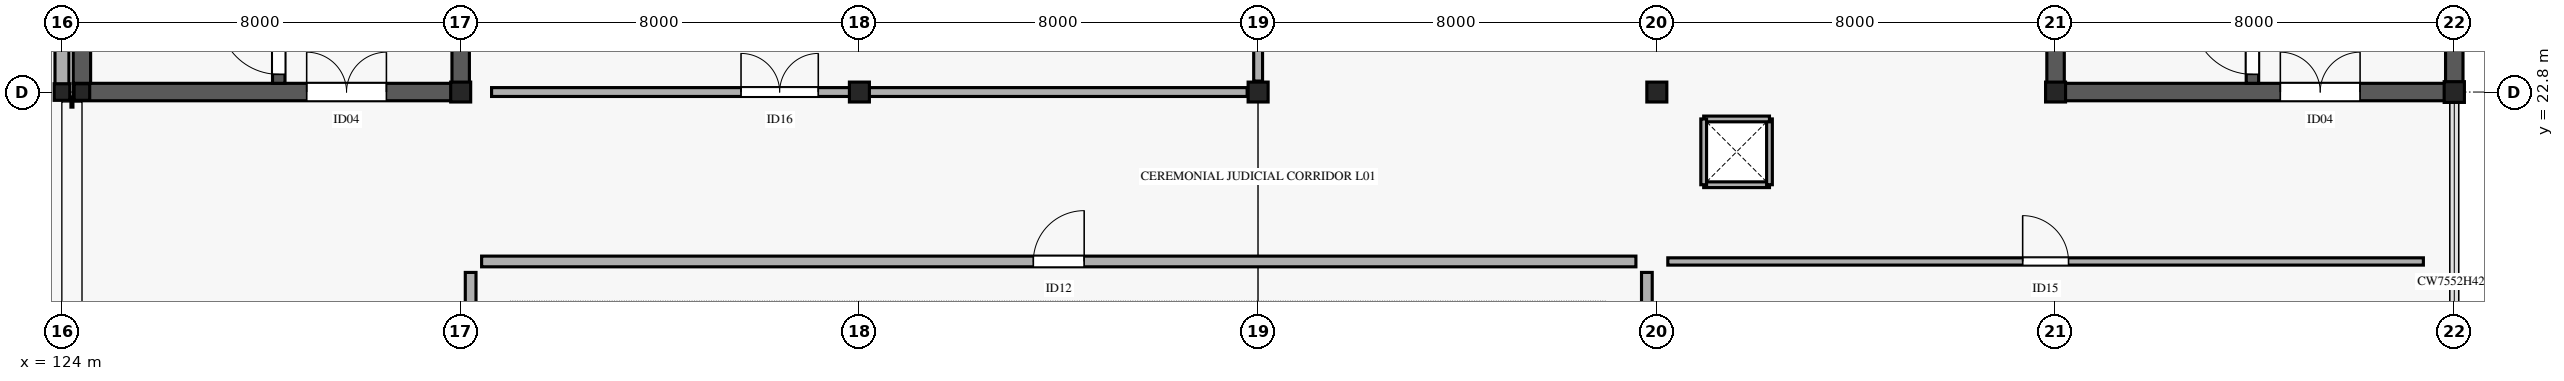
"""IFC4 building model, lengths in metres.
Left out: names, types, materials, properties, quantities, classifications, styles, units other than length and angle.
Written with IfcOpenShell. Run it as: python <this file> out.ifc"""

import sys

from ifc_helpers import new_model, si_unit, direction, frame, frame_2d, origin, origin_2d, place, context, subcontext, project, spatial, rectangle, i_section, extrude, element, fill, save


model = new_model("IFC4")
c1 = context("Model", 3, precision=1e-05, world=origin(), true_north=direction((0.0, 1.0)))
c2 = subcontext(c1, "Body", "Model", "MODEL_VIEW")
j1 = project(units=[si_unit("LENGTHUNIT", "METRE"), si_unit("PLANEANGLEUNIT", "RADIAN")], contexts=[c1])
p1 = place(None, origin())
s1 = spatial("IfcSite", under=j1, at=p1, CompositionType="ELEMENT")
p2 = place(p1, origin())
s2 = spatial("IfcBuilding", under=s1, at=p2, CompositionType="ELEMENT")
p3 = place(p2, frame((0.0, 0.0, 5.4)))
s3 = spatial("IfcBuildingStorey", under=s2, at=p3, CompositionType="ELEMENT", Elevation=5.4)
p4 = place(p3, frame((124.4, 22.8, 0.0), z_axis=(0.0, 0.0, 1.0), x_axis=(1.0, 0.0, 0.0)))
e1 = element("IfcColumn", 1, at=p4, inside=s3, PredefinedType="COLUMN", context=c2, shape_type="SweptSolid", body=[
    extrude(i_section(OverallWidth=0.313, OverallDepth=0.333, WebThickness=0.018, FlangeThickness=0.028, FilletRadius=0.015, at=origin_2d()), origin(), (0.0, 0.0, 1.0), 5.185),
])
for number, where, z_axis, x_axis in (
    (2, (132.0, 22.8, 0.0), (0.0, 0.0, 1.0), (1.0, 0.0, 0.0)),
    (3, (140.0, 22.8, 0.0), (0.0, 0.0, 1.0), (1.0, 0.0, 0.0)),
    (4, (148.0, 22.8, 0.0), (0.0, 0.0, 1.0), (1.0, 0.0, 0.0)),
    (5, (156.0, 22.8, 0.0), (0.0, 0.0, 1.0), (1.0, 0.0, 0.0)),
    (6, (164.0, 22.8, 0.0), (0.0, 0.0, 1.0), (1.0, 0.0, 0.0)),
):
    element("IfcColumn", number, at=place(p3, frame(where, z_axis=z_axis, x_axis=x_axis)), inside=s3, PredefinedType="COLUMN", context=c2, shape_type="SweptSolid", body=[
        extrude(i_section(OverallWidth=0.401, OverallDepth=0.399, WebThickness=0.025, FlangeThickness=0.04, FilletRadius=0.015, at=origin_2d()), origin(), (0.0, 0.0, 1.0), 5.185),
    ])
p5 = place(p3, frame((172.0, 22.8, 0.0), z_axis=(0.0, 0.0, 1.0), x_axis=(1.0, 0.0, 0.0)))
e7 = element("IfcColumn", 7, at=p5, inside=s3, PredefinedType="COLUMN", context=c2, shape_type="SweptSolid", body=[
    extrude(i_section(OverallWidth=0.406, OverallDepth=0.416, WebThickness=0.03, FlangeThickness=0.048, FilletRadius=0.015, at=origin_2d()), origin(), (0.0, 0.0, 1.0), 5.185),
])
p6 = place(p3, frame((124.0, 22.8, 0.0), z_axis=(0.0, 0.0, 1.0), x_axis=(1.0, 0.0, 0.0)))
e8 = element("IfcColumn", 8, at=p6, inside=s3, PredefinedType="COLUMN", context=c2, shape_type="SweptSolid", body=[
    extrude(i_section(OverallWidth=0.313, OverallDepth=0.333, WebThickness=0.018, FlangeThickness=0.028, FilletRadius=0.015, at=origin_2d()), origin(), (0.0, 0.0, 1.0), 5.185),
])
p7 = place(p3, frame((124.0, 30.42, 0.0), z_axis=(0.0, 0.0, 1.0), x_axis=(0.0, -1.0, 0.0)))
e9 = element("IfcWall", 9, at=p7, inside=s3, PredefinedType="STANDARD", context=c2, shape_type="SweptSolid", body=[
    extrude(rectangle(XDim=7.64, YDim=0.28, at=frame_2d((3.82, 0.0))), origin(), (0.0, 0.0, 1.0), 4.25),
])
p8 = place(p7, frame((2.37, 0.0, 0.75)))
e10 = element("IfcOpeningElement", 10, at=p8, cuts=e9, PredefinedType="OPENING", context=c2, shape_type="SweptSolid", body=[
    extrude(rectangle(XDim=2.9, YDim=2.15, at=frame_2d((1.45, 1.075))), frame((0.0, 0.15, 0.0), z_axis=(0.0, -1.0, 0.0), x_axis=(1.0, 0.0, 0.0)), (0.0, 0.0, 1.0), 0.3),
])
p9 = place(p3, frame((124.18, 22.6, 0.0), z_axis=(0.0, 0.0, 1.0), x_axis=(1.0, 0.0, 0.0)))
e11 = element("IfcWall", 11, at=p9, inside=s3, PredefinedType="STANDARD", context=c2, shape_type="SweptSolid", body=[
    extrude(rectangle(XDim=0.04, YDim=0.205, at=frame_2d((0.02, 0.0))), origin(), (0.0, 0.0, 1.0), 4.62),
])
for number, where, z_axis, x_axis in (
    (12, (156.94, 20.94, 0.0), (0.0, 0.0, 1.0), (1.0, 0.0, 0.0)),
    (13, (158.26, 20.94, 0.0), (0.0, 0.0, 1.0), (0.0, 1.0, 0.0)),
    (14, (158.26, 22.26, 0.0), (0.0, 0.0, 1.0), (-1.0, 0.0, 0.0)),
    (15, (156.94, 22.26, 0.0), (0.0, 0.0, 1.0), (0.0, -1.0, 0.0)),
):
    element("IfcWall", number, at=place(p3, frame(where, z_axis=z_axis, x_axis=x_axis)), inside=s3, PredefinedType="PARTITIONING", context=c2, shape_type="SweptSolid", body=[
        extrude(rectangle(XDim=1.32, YDim=0.115, at=frame_2d((0.66, 0.0))), origin(), (0.0, 0.0, 1.0), 4.35),
    ])
p10 = place(p3, frame((124.225, 22.8, 0.0), z_axis=(0.0, 0.0, 1.0), x_axis=(1.0, 0.0, 0.0)))
e16 = element("IfcWall", 16, at=p10, inside=s3, PredefinedType="SHEAR", context=c2, shape_type="SweptSolid", body=[
    extrude(rectangle(XDim=7.95, YDim=0.35, at=frame_2d((3.975, 0.0))), origin(), (0.0, 0.0, 1.0), 5.19),
])
p11 = place(p10, frame((4.685, 0.0, 0.0)))
e17 = element("IfcOpeningElement", 17, at=p11, cuts=e16, PredefinedType="OPENING", context=c2, shape_type="SweptSolid", body=[
    extrude(rectangle(XDim=1.6, YDim=2.35, at=frame_2d((0.8, 1.175))), frame((0.0, 0.185, 0.0), z_axis=(0.0, -1.0, 0.0), x_axis=(1.0, 0.0, 0.0)), (0.0, 0.0, 1.0), 0.37),
])
for number, where, z_axis, x_axis in (
    (18, (124.4, 22.975, 0.0), (0.0, 0.0, 1.0), (0.0, 1.0, 0.0)),
    (19, (132.0, 22.975, 0.0), (0.0, 0.0, 1.0), (0.0, 1.0, 0.0)),
):
    element("IfcWall", number, at=place(p3, frame(where, z_axis=z_axis, x_axis=x_axis)), inside=s3, PredefinedType="SHEAR", context=c2, shape_type="SweptSolid", body=[
        extrude(rectangle(XDim=7.25, YDim=0.35, at=frame_2d((3.625, 0.0))), origin(), (0.0, 0.0, 1.0), 5.19),
    ])
p12 = place(p3, frame((128.35, 22.975, 0.0), z_axis=(0.0, 0.0, 1.0), x_axis=(0.0, 1.0, 0.0)))
e20 = element("IfcWall", 20, at=p12, inside=s3, PredefinedType="SHEAR", context=c2, shape_type="SweptSolid", body=[
    extrude(rectangle(XDim=7.25, YDim=0.25, at=frame_2d((3.625, 0.0))), origin(), (0.0, 0.0, 1.0), 5.19),
])
p13 = place(p12, frame((0.18, 0.0, 0.0)))
e21 = element("IfcOpeningElement", 21, at=p13, cuts=e20, PredefinedType="OPENING", context=c2, shape_type="SweptSolid", body=[
    extrude(rectangle(XDim=1.2, YDim=2.2, at=frame_2d((0.6, 1.1))), frame((0.0, 0.135, 0.0), z_axis=(0.0, -1.0, 0.0), x_axis=(1.0, 0.0, 0.0)), (0.0, 0.0, 1.0), 0.27),
])
p14 = place(p3, frame((163.825, 22.8, 0.0), z_axis=(0.0, 0.0, 1.0), x_axis=(1.0, 0.0, 0.0)))
e22 = element("IfcWall", 22, at=p14, inside=s3, PredefinedType="SHEAR", context=c2, shape_type="SweptSolid", body=[
    extrude(rectangle(XDim=8.35, YDim=0.35, at=frame_2d((4.175, 0.0))), origin(), (0.0, 0.0, 1.0), 5.19),
])
p15 = place(p14, frame((4.685, 0.0, 0.0)))
e23 = element("IfcOpeningElement", 23, at=p15, cuts=e22, PredefinedType="OPENING", context=c2, shape_type="SweptSolid", body=[
    extrude(rectangle(XDim=1.6, YDim=2.35, at=frame_2d((0.8, 1.175))), frame((0.0, 0.185, 0.0), z_axis=(0.0, -1.0, 0.0), x_axis=(1.0, 0.0, 0.0)), (0.0, 0.0, 1.0), 0.37),
])
for number, where, z_axis, x_axis in (
    (24, (164.0, 22.975, 0.0), (0.0, 0.0, 1.0), (0.0, 1.0, 0.0)),
    (25, (172.0, 22.975, 0.0), (0.0, 0.0, 1.0), (0.0, 1.0, 0.0)),
):
    element("IfcWall", number, at=place(p3, frame(where, z_axis=z_axis, x_axis=x_axis)), inside=s3, PredefinedType="SHEAR", context=c2, shape_type="SweptSolid", body=[
        extrude(rectangle(XDim=7.25, YDim=0.35, at=frame_2d((3.625, 0.0))), origin(), (0.0, 0.0, 1.0), 5.19),
    ])
p16 = place(p3, frame((167.95, 22.975, 0.0), z_axis=(0.0, 0.0, 1.0), x_axis=(0.0, 1.0, 0.0)))
e26 = element("IfcWall", 26, at=p16, inside=s3, PredefinedType="SHEAR", context=c2, shape_type="SweptSolid", body=[
    extrude(rectangle(XDim=7.25, YDim=0.25, at=frame_2d((3.625, 0.0))), origin(), (0.0, 0.0, 1.0), 5.19),
])
p17 = place(p16, frame((0.18, 0.0, 0.0)))
e27 = element("IfcOpeningElement", 27, at=p17, cuts=e26, PredefinedType="OPENING", context=c2, shape_type="SweptSolid", body=[
    extrude(rectangle(XDim=1.2, YDim=2.2, at=frame_2d((0.6, 1.1))), frame((0.0, 0.135, 0.0), z_axis=(0.0, -1.0, 0.0), x_axis=(1.0, 0.0, 0.0)), (0.0, 0.0, 1.0), 0.27),
])
p18 = place(p3, frame((132.42, 19.4, 0.0), z_axis=(0.0, 0.0, 1.0), x_axis=(1.0, 0.0, 0.0)))
e28 = element("IfcWall", 28, at=p18, inside=s3, PredefinedType="PARTITIONING", context=c2, shape_type="SweptSolid", body=[
    extrude(rectangle(XDim=23.16, YDim=0.215, at=frame_2d((11.58, 0.0))), origin(), (0.0, 0.0, 1.0), 4.05),
])
p19 = place(p18, frame((11.07, 0.0, 0.0)))
e29 = element("IfcOpeningElement", 29, at=p19, cuts=e28, PredefinedType="OPENING", context=c2, shape_type="SweptSolid", body=[
    extrude(rectangle(XDim=1.02, YDim=2.25, at=frame_2d((0.51, 1.125))), frame((0.0, 0.117, 0.0), z_axis=(0.0, -1.0, 0.0), x_axis=(1.0, 0.0, 0.0)), (0.0, 0.0, 1.0), 0.235),
])
for number, where, z_axis, x_axis in (
    (30, (155.8, 8.02, 0.0), (0.0, 0.0, 1.0), (0.0, 1.0, 0.0)),
    (31, (132.2, 8.02, 0.0), (0.0, 0.0, 1.0), (0.0, 1.0, 0.0)),
):
    element("IfcWall", number, at=place(p3, frame(where, z_axis=z_axis, x_axis=x_axis)), inside=s3, PredefinedType="PARTITIONING", context=c2, shape_type="SweptSolid", body=[
        extrude(rectangle(XDim=11.16, YDim=0.215, at=frame_2d((5.58, 0.0))), origin(), (0.0, 0.0, 1.0), 4.05),
    ])
p20 = place(p3, frame((156.22, 19.4, 0.0), z_axis=(0.0, 0.0, 1.0), x_axis=(1.0, 0.0, 0.0)))
e32 = element("IfcWall", 32, at=p20, inside=s3, PredefinedType="PARTITIONING", context=c2, shape_type="SweptSolid", body=[
    extrude(rectangle(XDim=15.16, YDim=0.146, at=frame_2d((7.58, 0.0))), origin(), (0.0, 0.0, 1.0), 4.05),
])
p21 = place(p20, frame((7.12, 0.0, 0.0)))
e33 = element("IfcOpeningElement", 33, at=p21, cuts=e32, PredefinedType="OPENING", context=c2, shape_type="SweptSolid", body=[
    extrude(rectangle(XDim=0.92, YDim=2.2, at=frame_2d((0.46, 1.1))), frame((0.0, 0.083, 0.0), z_axis=(0.0, -1.0, 0.0), x_axis=(1.0, 0.0, 0.0)), (0.0, 0.0, 1.0), 0.166),
])
p22 = place(p3, frame((132.62, 22.8, 0.0), z_axis=(0.0, 0.0, 1.0), x_axis=(1.0, 0.0, 0.0)))
e34 = element("IfcWall", 34, at=p22, inside=s3, PredefinedType="PARTITIONING", context=c2, shape_type="SweptSolid", body=[
    extrude(rectangle(XDim=15.16, YDim=0.178, at=frame_2d((7.58, 0.0))), origin(), (0.0, 0.0, 1.0), 4.05),
])
p23 = place(p22, frame((5.005, 0.0, 0.0)))
e35 = element("IfcOpeningElement", 35, at=p23, cuts=e34, PredefinedType="OPENING", context=c2, shape_type="SweptSolid", body=[
    extrude(rectangle(XDim=1.55, YDim=2.3, at=frame_2d((0.775, 1.15))), frame((0.0, 0.099, 0.0), z_axis=(0.0, -1.0, 0.0), x_axis=(1.0, 0.0, 0.0)), (0.0, 0.0, 1.0), 0.198),
])
p24 = place(p3, frame((148.0, 23.02, 0.0), z_axis=(0.0, 0.0, 1.0), x_axis=(0.0, 1.0, 0.0)))
e36 = element("IfcWall", 36, at=p24, inside=s3, PredefinedType="PARTITIONING", context=c2, shape_type="SweptSolid", body=[
    extrude(rectangle(XDim=6.76, YDim=0.178, at=frame_2d((3.38, 0.0))), origin(), (0.0, 0.0, 1.0), 4.05),
])
p25 = place(p24, frame((2.655, 0.0, 0.0)))
e37 = element("IfcOpeningElement", 37, at=p25, cuts=e36, PredefinedType="OPENING", context=c2, shape_type="SweptSolid", body=[
    extrude(rectangle(XDim=1.45, YDim=2.25, at=frame_2d((0.725, 1.125))), frame((0.0, 0.099, 0.0), z_axis=(0.0, -1.0, 0.0), x_axis=(1.0, 0.0, 0.0)), (0.0, 0.0, 1.0), 0.198),
])
p26 = place(p13, origin())
e38 = element("IfcDoor", 38, at=p26, inside=s3, OperationType="SINGLE_SWING_RIGHT", PredefinedType="DOOR", context=c2, shape_type="SweptSolid", body=[
    extrude(rectangle(XDim=1.2, YDim=2.2, at=frame_2d((0.6, 1.1))), frame((0.0, 0.025, 0.0), z_axis=(0.0, -1.0, 0.0), x_axis=(1.0, 0.0, 0.0)), (0.0, 0.0, 1.0), 0.05),
])
fill(e21, e38)
p27 = place(p11, origin())
e39 = element("IfcDoor", 39, at=p27, inside=s3, OperationType="DOUBLE_DOOR_SINGLE_SWING", PredefinedType="DOOR", context=c2, shape_type="SweptSolid", body=[
    extrude(rectangle(XDim=1.6, YDim=2.35, at=frame_2d((0.8, 1.175))), frame((0.0, 0.025, 0.0), z_axis=(0.0, -1.0, 0.0), x_axis=(1.0, 0.0, 0.0)), (0.0, 0.0, 1.0), 0.05),
])
fill(e17, e39)
p28 = place(p17, origin())
e40 = element("IfcDoor", 40, at=p28, inside=s3, OperationType="SINGLE_SWING_RIGHT", PredefinedType="DOOR", context=c2, shape_type="SweptSolid", body=[
    extrude(rectangle(XDim=1.2, YDim=2.2, at=frame_2d((0.6, 1.1))), frame((0.0, 0.025, 0.0), z_axis=(0.0, -1.0, 0.0), x_axis=(1.0, 0.0, 0.0)), (0.0, 0.0, 1.0), 0.05),
])
fill(e27, e40)
p29 = place(p15, origin())
e41 = element("IfcDoor", 41, at=p29, inside=s3, OperationType="DOUBLE_DOOR_SINGLE_SWING", PredefinedType="DOOR", context=c2, shape_type="SweptSolid", body=[
    extrude(rectangle(XDim=1.6, YDim=2.35, at=frame_2d((0.8, 1.175))), frame((0.0, 0.025, 0.0), z_axis=(0.0, -1.0, 0.0), x_axis=(1.0, 0.0, 0.0)), (0.0, 0.0, 1.0), 0.05),
])
fill(e23, e41)
p30 = place(p19, origin())
e42 = element("IfcDoor", 42, at=p30, inside=s3, OperationType="SINGLE_SWING_RIGHT", PredefinedType="DOOR", context=c2, shape_type="SweptSolid", body=[
    extrude(rectangle(XDim=1.02, YDim=2.25, at=frame_2d((0.51, 1.125))), frame((0.0, 0.025, 0.0), z_axis=(0.0, -1.0, 0.0), x_axis=(1.0, 0.0, 0.0)), (0.0, 0.0, 1.0), 0.05),
])
fill(e29, e42)
p31 = place(p21, origin())
e43 = element("IfcDoor", 43, at=p31, inside=s3, OperationType="SINGLE_SWING_LEFT", PredefinedType="DOOR", context=c2, shape_type="SweptSolid", body=[
    extrude(rectangle(XDim=0.92, YDim=2.2, at=frame_2d((0.46, 1.1))), frame((0.0, 0.025, 0.0), z_axis=(0.0, -1.0, 0.0), x_axis=(1.0, 0.0, 0.0)), (0.0, 0.0, 1.0), 0.05),
])
fill(e33, e43)
p32 = place(p23, origin())
e44 = element("IfcDoor", 44, at=p32, inside=s3, OperationType="DOUBLE_DOOR_SINGLE_SWING", PredefinedType="DOOR", context=c2, shape_type="SweptSolid", body=[
    extrude(rectangle(XDim=1.55, YDim=2.3, at=frame_2d((0.775, 1.15))), frame((0.0, 0.025, 0.0), z_axis=(0.0, -1.0, 0.0), x_axis=(1.0, 0.0, 0.0)), (0.0, 0.0, 1.0), 0.05),
])
fill(e35, e44)
save(model, sys.argv[1])
